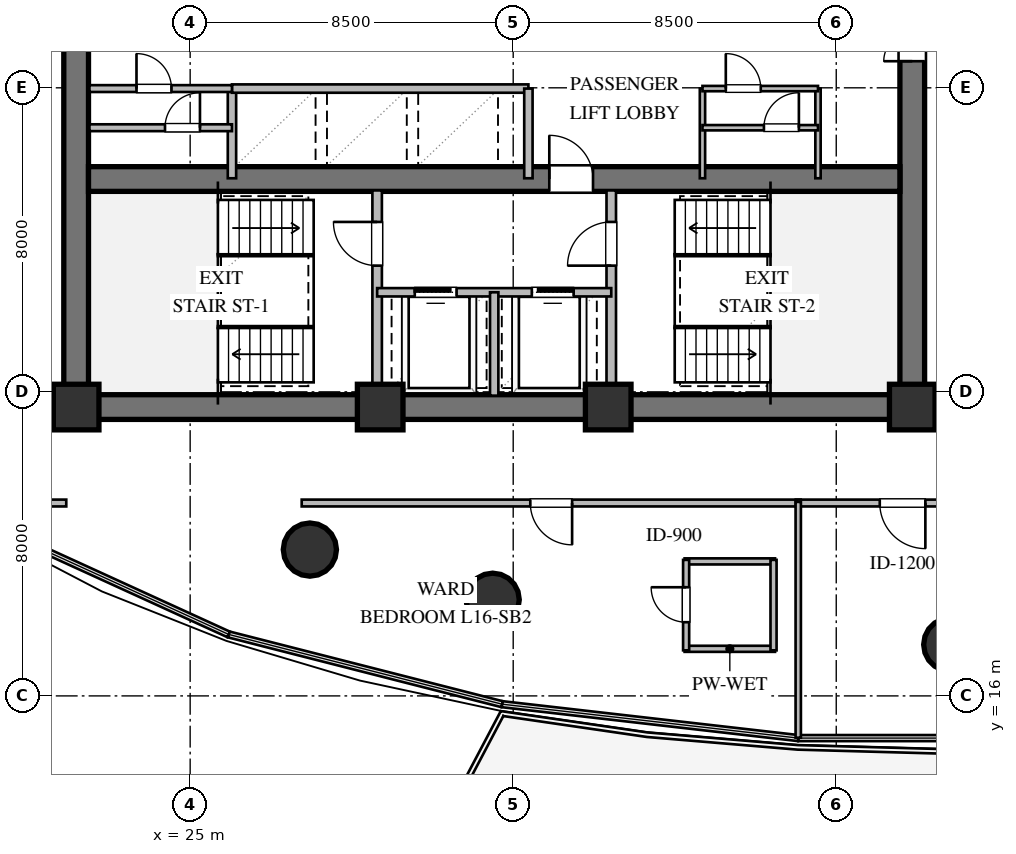
"""IFC4 building model, lengths in metres.
Left out: names, types, materials, properties, quantities, classifications, styles, units other than length and angle.
Written with IfcOpenShell. Run it as: python <this file> out.ifc"""

import sys

from ifc_helpers import new_model, si_unit, direction, frame, frame_2d, origin, origin_2d, place, context, subcontext, project, spatial, rectangle, circle, extrude, element, fill, save


model = new_model("IFC4")
c1 = context("Model", 3, precision=1e-05, world=origin(), true_north=direction((0.0, 1.0)))
c2 = subcontext(c1, "Body", "Model", "MODEL_VIEW")
j1 = project(units=[si_unit("LENGTHUNIT", "METRE"), si_unit("PLANEANGLEUNIT", "RADIAN")], contexts=[c1])
p1 = place(None, origin())
s1 = spatial("IfcSite", under=j1, at=p1, CompositionType="ELEMENT")
p2 = place(p1, origin())
s2 = spatial("IfcBuilding", under=s1, at=p2, CompositionType="ELEMENT")
p3 = place(p2, frame((0.0, 0.0, 63.6)))
s3 = spatial("IfcBuildingStorey", under=s2, at=p3, CompositionType="ELEMENT", Elevation=63.6)
p4 = place(p3, frame((21.675, 23.6, 0.0), z_axis=(0.0, 0.0, 1.0), x_axis=(1.0, 0.0, 0.0)))
e1 = element("IfcWall", 1, at=p4, inside=s3, PredefinedType="SHEAR", context=c2, shape_type="SweptSolid", body=[
    extrude(rectangle(XDim=22.65, YDim=0.65, at=frame_2d((11.325, 0.0))), origin(), (0.0, 0.0, 1.0), 3.36),
])
p5 = place(p3, frame((22.0, 23.925, 0.0), z_axis=(0.0, 0.0, 1.0), x_axis=(0.0, 1.0, 0.0)))
e2 = element("IfcWall", 2, at=p5, inside=s3, PredefinedType="SHEAR", context=c2, shape_type="SweptSolid", body=[
    extrude(rectangle(XDim=12.15, YDim=0.65, at=frame_2d((6.075, 0.0))), origin(), (0.0, 0.0, 1.0), 3.36),
])
p6 = place(p3, frame((44.0, 23.925, 0.0), z_axis=(0.0, 0.0, 1.0), x_axis=(0.0, 1.0, 0.0)))
e3 = element("IfcWall", 3, at=p6, inside=s3, PredefinedType="SHEAR", context=c2, shape_type="SweptSolid", body=[
    extrude(rectangle(XDim=12.15, YDim=0.65, at=frame_2d((6.075, 0.0))), origin(), (0.0, 0.0, 1.0), 3.36),
])
p7 = place(p6, frame((8.775, 0.0, 0.0)))
e4 = element("IfcOpeningElement", 4, at=p7, cuts=e3, PredefinedType="OPENING", context=c2, shape_type="SweptSolid", body=[
    extrude(rectangle(XDim=1.5, YDim=2.15, at=frame_2d((0.75, 1.075))), frame((0.0, 0.335, 0.0), z_axis=(0.0, -1.0, 0.0), x_axis=(1.0, 0.0, 0.0)), (0.0, 0.0, 1.0), 0.67),
])
p8 = place(p3, frame((22.325, 29.6, 0.0), z_axis=(0.0, 0.0, 1.0), x_axis=(1.0, 0.0, 0.0)))
e5 = element("IfcWall", 5, at=p8, inside=s3, PredefinedType="SHEAR", context=c2, shape_type="SweptSolid", body=[
    extrude(rectangle(XDim=21.35, YDim=0.65, at=frame_2d((10.675, 0.0))), origin(), (0.0, 0.0, 1.0), 3.36),
])
p9 = place(p8, frame((12.125, 0.0, 0.0)))
e6 = element("IfcOpeningElement", 6, at=p9, cuts=e5, PredefinedType="OPENING", context=c2, shape_type="SweptSolid", body=[
    extrude(rectangle(XDim=1.15, YDim=2.1, at=frame_2d((0.575, 1.05))), frame((0.0, 0.335, 0.0), z_axis=(0.0, -1.0, 0.0), x_axis=(1.0, 0.0, 0.0)), (0.0, 0.0, 1.0), 0.67),
])
for number, where, z_axis, x_axis in (
    (7, (22.0, 23.6, 0.0), (0.0, 0.0, 1.0), (1.0, 0.0, 0.0)),
    (8, (30.0, 23.6, 0.0), (0.0, 0.0, 1.0), (1.0, 0.0, 0.0)),
    (9, (36.0, 23.6, 0.0), (0.0, 0.0, 1.0), (1.0, 0.0, 0.0)),
    (10, (44.0, 23.6, 0.0), (0.0, 0.0, 1.0), (1.0, 0.0, 0.0)),
):
    element("IfcColumn", number, at=place(p3, frame(where, z_axis=z_axis, x_axis=x_axis)), inside=s3, PredefinedType="COLUMN", context=c2, shape_type="SweptSolid", body=[
        extrude(rectangle(XDim=1.2, YDim=1.2, at=origin_2d()), origin(), (0.0, 0.0, 1.0), 3.6),
    ])
for number, where, z_axis, x_axis in (
    (11, (28.15, 19.85, 0.0), (0.0, 0.0, 1.0), (1.0, 0.0, 0.0)),
    (12, (32.96, 18.53, 0.0), (0.0, 0.0, 1.0), (1.0, 0.0, 0.0)),
    (13, (45.0, 17.35, 0.0), (0.0, 0.0, 1.0), (1.0, 0.0, 0.0)),
):
    element("IfcColumn", number, at=place(p3, frame(where, z_axis=z_axis, x_axis=x_axis)), inside=s3, PredefinedType="COLUMN", context=c2, shape_type="SweptSolid", body=[
        extrude(circle(Radius=0.7, at=origin_2d()), origin(), (0.0, 0.0, 1.0), 3.6),
    ])
p10 = place(p3, frame((29.92, 23.9, 0.0), z_axis=(0.0, 0.0, 1.0), x_axis=(0.0, 1.0, 0.0)))
e14 = element("IfcWall", 14, at=p10, inside=s3, PredefinedType="SOLIDWALL", context=c2, shape_type="SweptSolid", body=[
    extrude(rectangle(XDim=5.4, YDim=0.25, at=frame_2d((2.7, 0.0))), origin(), (0.0, 0.0, 1.0), 3.36),
])
p11 = place(p10, frame((3.421, 0.0, 0.0)))
e15 = element("IfcOpeningElement", 15, at=p11, cuts=e14, PredefinedType="OPENING", context=c2, shape_type="SweptSolid", body=[
    extrude(rectangle(XDim=1.15, YDim=2.1, at=frame_2d((0.575, 1.05))), frame((0.0, 0.135, 0.0), z_axis=(0.0, -1.0, 0.0), x_axis=(1.0, 0.0, 0.0)), (0.0, 0.0, 1.0), 0.27),
])
p12 = place(p3, frame((36.08, 23.9, 0.0), z_axis=(0.0, 0.0, 1.0), x_axis=(0.0, 1.0, 0.0)))
e16 = element("IfcWall", 16, at=p12, inside=s3, PredefinedType="SOLIDWALL", context=c2, shape_type="SweptSolid", body=[
    extrude(rectangle(XDim=5.4, YDim=0.25, at=frame_2d((2.7, 0.0))), origin(), (0.0, 0.0, 1.0), 3.36),
])
p13 = place(p12, frame((3.421, 0.0, 0.0)))
e17 = element("IfcOpeningElement", 17, at=p13, cuts=e16, PredefinedType="OPENING", context=c2, shape_type="SweptSolid", body=[
    extrude(rectangle(XDim=1.15, YDim=2.1, at=frame_2d((0.575, 1.05))), frame((0.0, 0.135, 0.0), z_axis=(0.0, -1.0, 0.0), x_axis=(1.0, 0.0, 0.0)), (0.0, 0.0, 1.0), 0.27),
])
p14 = place(p3, frame((29.92, 26.62, 0.0), z_axis=(0.0, 0.0, 1.0), x_axis=(1.0, 0.0, 0.0)))
e18 = element("IfcWall", 18, at=p14, inside=s3, PredefinedType="SOLIDWALL", context=c2, shape_type="SweptSolid", body=[
    extrude(rectangle(XDim=6.16, YDim=0.22, at=frame_2d((3.08, 0.0))), origin(), (0.0, 0.0, 1.0), 3.36),
])
p15 = place(p14, frame((0.99, 0.0, 0.0)))
e19 = element("IfcOpeningElement", 19, at=p15, cuts=e18, PredefinedType="OPENING", context=c2, shape_type="SweptSolid", body=[
    extrude(rectangle(XDim=1.1, YDim=2.1, at=frame_2d((0.55, 1.05))), frame((0.0, 0.12, 0.0), z_axis=(0.0, -1.0, 0.0), x_axis=(1.0, 0.0, 0.0)), (0.0, 0.0, 1.0), 0.24),
])
p16 = place(p14, frame((4.07, 0.0, 0.0)))
e20 = element("IfcOpeningElement", 20, at=p16, cuts=e18, PredefinedType="OPENING", context=c2, shape_type="SweptSolid", body=[
    extrude(rectangle(XDim=1.1, YDim=2.1, at=frame_2d((0.55, 1.05))), frame((0.0, 0.12, 0.0), z_axis=(0.0, -1.0, 0.0), x_axis=(1.0, 0.0, 0.0)), (0.0, 0.0, 1.0), 0.24),
])
p17 = place(p3, frame((33.0, 23.9, 0.0), z_axis=(0.0, 0.0, 1.0), x_axis=(0.0, 1.0, 0.0)))
e21 = element("IfcWall", 21, at=p17, inside=s3, PredefinedType="SOLIDWALL", context=c2, shape_type="SweptSolid", body=[
    extrude(rectangle(XDim=2.72, YDim=0.22, at=frame_2d((1.36, 0.0))), origin(), (0.0, 0.0, 1.0), 3.36),
])
p18 = place(p3, frame((26.1, 29.62, 0.0), z_axis=(0.0, 0.0, 1.0), x_axis=(0.0, 1.0, 0.0)))
e22 = element("IfcWall", 22, at=p18, inside=s3, PredefinedType="SOLIDWALL", context=c2, shape_type="SweptSolid", body=[
    extrude(rectangle(XDim=2.36, YDim=0.22, at=frame_2d((1.18, 0.0))), origin(), (0.0, 0.0, 1.0), 3.36),
])
p19 = place(p3, frame((26.1, 31.98, 0.0), z_axis=(0.0, 0.0, 1.0), x_axis=(1.0, 0.0, 0.0)))
e23 = element("IfcWall", 23, at=p19, inside=s3, PredefinedType="SOLIDWALL", context=c2, shape_type="SweptSolid", body=[
    extrude(rectangle(XDim=7.8, YDim=0.22, at=frame_2d((3.9, 0.0))), origin(), (0.0, 0.0, 1.0), 3.36),
])
p20 = place(p3, frame((33.9, 29.62, 0.0), z_axis=(0.0, 0.0, 1.0), x_axis=(0.0, 1.0, 0.0)))
e24 = element("IfcWall", 24, at=p20, inside=s3, PredefinedType="SOLIDWALL", context=c2, shape_type="SweptSolid", body=[
    extrude(rectangle(XDim=2.36, YDim=0.22, at=frame_2d((1.18, 0.0))), origin(), (0.0, 0.0, 1.0), 3.36),
])
p21 = place(p3, frame((22.35, 30.95, 0.0), z_axis=(0.0, 0.0, 1.0), x_axis=(1.0, 0.0, 0.0)))
e25 = element("IfcWall", 25, at=p21, inside=s3, PredefinedType="PARTITIONING", context=c2, shape_type="SweptSolid", body=[
    extrude(rectangle(XDim=3.75, YDim=0.18, at=frame_2d((1.875, 0.0))), origin(), (0.0, 0.0, 1.0), 3.36),
])
p22 = place(p21, frame((1.988, 0.0, 0.0)))
e26 = element("IfcOpeningElement", 26, at=p22, cuts=e25, PredefinedType="OPENING", context=c2, shape_type="SweptSolid", body=[
    extrude(rectangle(XDim=0.92, YDim=2.1, at=frame_2d((0.46, 1.05))), frame((0.0, 0.1, 0.0), z_axis=(0.0, -1.0, 0.0), x_axis=(1.0, 0.0, 0.0)), (0.0, 0.0, 1.0), 0.2),
])
p23 = place(p3, frame((22.35, 31.98, 0.0), z_axis=(0.0, 0.0, 1.0), x_axis=(1.0, 0.0, 0.0)))
e27 = element("IfcWall", 27, at=p23, inside=s3, PredefinedType="PARTITIONING", context=c2, shape_type="SweptSolid", body=[
    extrude(rectangle(XDim=3.75, YDim=0.18, at=frame_2d((1.875, 0.0))), origin(), (0.0, 0.0, 1.0), 3.36),
])
p24 = place(p23, frame((1.238, 0.0, 0.0)))
e28 = element("IfcOpeningElement", 28, at=p24, cuts=e27, PredefinedType="OPENING", context=c2, shape_type="SweptSolid", body=[
    extrude(rectangle(XDim=0.92, YDim=2.1, at=frame_2d((0.46, 1.05))), frame((0.0, 0.1, 0.0), z_axis=(0.0, -1.0, 0.0), x_axis=(1.0, 0.0, 0.0)), (0.0, 0.0, 1.0), 0.2),
])
for number, where, z_axis, x_axis in (
    (29, (38.48, 29.62, 0.0), (0.0, 0.0, 1.0), (0.0, 1.0, 0.0)),
    (30, (41.52, 29.62, 0.0), (0.0, 0.0, 1.0), (0.0, 1.0, 0.0)),
):
    element("IfcWall", number, at=place(p3, frame(where, z_axis=z_axis, x_axis=x_axis)), inside=s3, PredefinedType="PARTITIONING", context=c2, shape_type="SweptSolid", body=[
        extrude(rectangle(XDim=2.36, YDim=0.14, at=frame_2d((1.18, 0.0))), origin(), (0.0, 0.0, 1.0), 3.36),
    ])
p25 = place(p3, frame((38.48, 30.95, 0.0), z_axis=(0.0, 0.0, 1.0), x_axis=(1.0, 0.0, 0.0)))
e31 = element("IfcWall", 31, at=p25, inside=s3, PredefinedType="PARTITIONING", context=c2, shape_type="SweptSolid", body=[
    extrude(rectangle(XDim=3.04, YDim=0.14, at=frame_2d((1.52, 0.0))), origin(), (0.0, 0.0, 1.0), 3.36),
])
p26 = place(p25, frame((1.617, 0.0, 0.0)))
e32 = element("IfcOpeningElement", 32, at=p26, cuts=e31, PredefinedType="OPENING", context=c2, shape_type="SweptSolid", body=[
    extrude(rectangle(XDim=0.92, YDim=2.1, at=frame_2d((0.46, 1.05))), frame((0.0, 0.08, 0.0), z_axis=(0.0, -1.0, 0.0), x_axis=(1.0, 0.0, 0.0)), (0.0, 0.0, 1.0), 0.16),
])
p27 = place(p3, frame((38.48, 31.98, 0.0), z_axis=(0.0, 0.0, 1.0), x_axis=(1.0, 0.0, 0.0)))
e33 = element("IfcWall", 33, at=p27, inside=s3, PredefinedType="PARTITIONING", context=c2, shape_type="SweptSolid", body=[
    extrude(rectangle(XDim=3.04, YDim=0.14, at=frame_2d((1.52, 0.0))), origin(), (0.0, 0.0, 1.0), 3.36),
])
p28 = place(p27, frame((0.614, 0.0, 0.0)))
e34 = element("IfcOpeningElement", 34, at=p28, cuts=e33, PredefinedType="OPENING", context=c2, shape_type="SweptSolid", body=[
    extrude(rectangle(XDim=0.92, YDim=2.1, at=frame_2d((0.46, 1.05))), frame((0.0, 0.08, 0.0), z_axis=(0.0, -1.0, 0.0), x_axis=(1.0, 0.0, 0.0)), (0.0, 0.0, 1.0), 0.16),
])
p29 = place(p3, frame((38.01, 17.239, 0.0), z_axis=(0.0, 0.0, 1.0), x_axis=(1.0, 0.0, 0.0)))
e35 = element("IfcWall", 35, at=p29, inside=s3, PredefinedType="PLUMBINGWALL", context=c2, shape_type="SweptSolid", body=[
    extrude(rectangle(XDim=2.38, YDim=0.16, at=frame_2d((1.19, 0.0))), origin(), (0.0, 0.0, 1.0), 2.738),
])
p30 = place(p3, frame((38.01, 19.539, 0.0), z_axis=(0.0, 0.0, 1.0), x_axis=(1.0, 0.0, 0.0)))
e36 = element("IfcWall", 36, at=p30, inside=s3, PredefinedType="PLUMBINGWALL", context=c2, shape_type="SweptSolid", body=[
    extrude(rectangle(XDim=2.38, YDim=0.16, at=frame_2d((1.19, 0.0))), origin(), (0.0, 0.0, 1.0), 3.36),
])
p31 = place(p3, frame((38.05, 17.199, 0.0), z_axis=(0.0, 0.0, 1.0), x_axis=(0.0, 1.0, 0.0)))
e37 = element("IfcWall", 37, at=p31, inside=s3, PredefinedType="PLUMBINGWALL", context=c2, shape_type="SweptSolid", body=[
    extrude(rectangle(XDim=2.38, YDim=0.16, at=frame_2d((1.19, 0.0))), origin(), (0.0, 0.0, 1.0), 3.36),
])
p32 = place(p31, frame((0.74, 0.0, 0.0)))
e38 = element("IfcOpeningElement", 38, at=p32, cuts=e37, PredefinedType="OPENING", context=c2, shape_type="SweptSolid", body=[
    extrude(rectangle(XDim=0.92, YDim=2.1, at=frame_2d((0.46, 1.05))), frame((0.0, 0.09, 0.0), z_axis=(0.0, -1.0, 0.0), x_axis=(1.0, 0.0, 0.0)), (0.0, 0.0, 1.0), 0.18),
])
p33 = place(p3, frame((40.35, 17.199, 0.0), z_axis=(0.0, 0.0, 1.0), x_axis=(0.0, 1.0, 0.0)))
e39 = element("IfcWall", 39, at=p33, inside=s3, PredefinedType="PLUMBINGWALL", context=c2, shape_type="SweptSolid", body=[
    extrude(rectangle(XDim=2.38, YDim=0.16, at=frame_2d((1.19, 0.0))), origin(), (0.0, 0.0, 1.0), 3.36),
])
p34 = place(p3, frame((41.065, 21.075, 0.0), z_axis=(0.0, 0.0, 1.0), x_axis=(-1.0, 0.0, 0.0)))
e40 = element("IfcWall", 40, at=p34, inside=s3, PredefinedType="PARTITIONING", context=c2, shape_type="SweptSolid", body=[
    extrude(rectangle(XDim=13.13, YDim=0.18, at=frame_2d((6.565, 0.0))), origin(), (0.0, 0.0, 1.0), 2.996),
])
p35 = place(p34, frame((6.015, 0.0, 0.0)))
e41 = element("IfcOpeningElement", 41, at=p35, cuts=e40, PredefinedType="OPENING", context=c2, shape_type="SweptSolid", body=[
    extrude(rectangle(XDim=1.1, YDim=2.1, at=frame_2d((0.55, 1.05))), frame((0.0, 0.1, 0.0), z_axis=(0.0, -1.0, 0.0), x_axis=(1.0, 0.0, 0.0)), (0.0, 0.0, 1.0), 0.2),
])
p36 = place(p3, frame((46.555, 21.075, 0.0), z_axis=(0.0, 0.0, 1.0), x_axis=(-1.0, 0.0, 0.0)))
e42 = element("IfcWall", 42, at=p36, inside=s3, PredefinedType="PARTITIONING", context=c2, shape_type="SweptSolid", body=[
    extrude(rectangle(XDim=5.62, YDim=0.18, at=frame_2d((2.81, 0.0))), origin(), (0.0, 0.0, 1.0), 3.36),
])
p37 = place(p36, frame((2.21, 0.0, 0.0)))
e43 = element("IfcOpeningElement", 43, at=p37, cuts=e42, PredefinedType="OPENING", context=c2, shape_type="SweptSolid", body=[
    extrude(rectangle(XDim=1.2, YDim=2.15, at=frame_2d((0.6, 1.075))), frame((0.0, 0.1, 0.0), z_axis=(0.0, -1.0, 0.0), x_axis=(1.0, 0.0, 0.0)), (0.0, 0.0, 1.0), 0.2),
])
p38 = place(p3, frame((21.74, 21.075, 0.0), z_axis=(0.0, 0.0, 1.0), x_axis=(-1.0, 0.0, 0.0)))
e44 = element("IfcWall", 44, at=p38, inside=s3, PredefinedType="PARTITIONING", context=c2, shape_type="SweptSolid", body=[
    extrude(rectangle(XDim=2.645, YDim=0.18, at=frame_2d((1.323, 0.0))), origin(), (0.0, 0.0, 1.0), 3.36),
])
p39 = place(p3, frame((41.0, 21.105, 0.0), z_axis=(0.0, 0.0, 1.0), x_axis=(0.0, -1.0, 0.0)))
e45 = element("IfcWall", 45, at=p39, inside=s3, PredefinedType="PARTITIONING", context=c2, shape_type="SweptSolid", body=[
    extrude(rectangle(XDim=6.205, YDim=0.14, at=frame_2d((3.103, 0.0))), origin(), (0.0, 0.0, 1.0), 3.36),
])
p40 = place(p11, origin())
e46 = element("IfcDoor", 46, at=p40, inside=s3, OperationType="SINGLE_SWING_RIGHT", PredefinedType="DOOR", context=c2, shape_type="SweptSolid", body=[
    extrude(rectangle(XDim=1.15, YDim=2.1, at=frame_2d((0.575, 1.05))), frame((0.0, 0.025, 0.0), z_axis=(0.0, -1.0, 0.0), x_axis=(1.0, 0.0, 0.0)), (0.0, 0.0, 1.0), 0.05),
])
fill(e15, e46)
p41 = place(p13, origin())
e47 = element("IfcDoor", 47, at=p41, inside=s3, OperationType="SINGLE_SWING_LEFT", PredefinedType="DOOR", context=c2, shape_type="SweptSolid", body=[
    extrude(rectangle(XDim=1.15, YDim=2.1, at=frame_2d((0.575, 1.05))), frame((0.0, 0.025, 0.0), z_axis=(0.0, -1.0, 0.0), x_axis=(1.0, 0.0, 0.0)), (0.0, 0.0, 1.0), 0.05),
])
fill(e17, e47)
p42 = place(p15, origin())
e48 = element("IfcDoor", 48, at=p42, inside=s3, OperationType="SLIDING_TO_LEFT", PredefinedType="DOOR", context=c2, shape_type="SweptSolid", body=[
    extrude(rectangle(XDim=1.1, YDim=2.1, at=frame_2d((0.55, 1.05))), frame((0.0, 0.025, 0.0), z_axis=(0.0, -1.0, 0.0), x_axis=(1.0, 0.0, 0.0)), (0.0, 0.0, 1.0), 0.05),
])
fill(e19, e48)
p43 = place(p16, origin())
e49 = element("IfcDoor", 49, at=p43, inside=s3, OperationType="SLIDING_TO_RIGHT", PredefinedType="DOOR", context=c2, shape_type="SweptSolid", body=[
    extrude(rectangle(XDim=1.1, YDim=2.1, at=frame_2d((0.55, 1.05))), frame((0.0, 0.025, 0.0), z_axis=(0.0, -1.0, 0.0), x_axis=(1.0, 0.0, 0.0)), (0.0, 0.0, 1.0), 0.05),
])
fill(e20, e49)
p44 = place(p9, origin())
e50 = element("IfcDoor", 50, at=p44, inside=s3, OperationType="SINGLE_SWING_LEFT", PredefinedType="DOOR", context=c2, shape_type="SweptSolid", body=[
    extrude(rectangle(XDim=1.15, YDim=2.1, at=frame_2d((0.575, 1.05))), frame((0.0, 0.025, 0.0), z_axis=(0.0, -1.0, 0.0), x_axis=(1.0, 0.0, 0.0)), (0.0, 0.0, 1.0), 0.05),
])
fill(e6, e50)
p45 = place(p7, origin())
e51 = element("IfcDoor", 51, at=p45, inside=s3, OperationType="DOUBLE_DOOR_SINGLE_SWING", PredefinedType="DOOR", context=c2, shape_type="SweptSolid", body=[
    extrude(rectangle(XDim=1.5, YDim=2.15, at=frame_2d((0.75, 1.075))), frame((0.0, 0.025, 0.0), z_axis=(0.0, -1.0, 0.0), x_axis=(1.0, 0.0, 0.0)), (0.0, 0.0, 1.0), 0.05),
])
fill(e4, e51)
p46 = place(p24, origin())
e52 = element("IfcDoor", 52, at=p46, inside=s3, OperationType="SINGLE_SWING_LEFT", PredefinedType="DOOR", context=c2, shape_type="SweptSolid", body=[
    extrude(rectangle(XDim=0.92, YDim=2.1, at=frame_2d((0.46, 1.05))), frame((0.0, 0.025, 0.0), z_axis=(0.0, -1.0, 0.0), x_axis=(1.0, 0.0, 0.0)), (0.0, 0.0, 1.0), 0.05),
])
fill(e28, e52)
p47 = place(p22, origin())
e53 = element("IfcDoor", 53, at=p47, inside=s3, OperationType="SINGLE_SWING_RIGHT", PredefinedType="DOOR", context=c2, shape_type="SweptSolid", body=[
    extrude(rectangle(XDim=0.92, YDim=2.1, at=frame_2d((0.46, 1.05))), frame((0.0, 0.025, 0.0), z_axis=(0.0, -1.0, 0.0), x_axis=(1.0, 0.0, 0.0)), (0.0, 0.0, 1.0), 0.05),
])
fill(e26, e53)
p48 = place(p28, origin())
e54 = element("IfcDoor", 54, at=p48, inside=s3, OperationType="SINGLE_SWING_LEFT", PredefinedType="DOOR", context=c2, shape_type="SweptSolid", body=[
    extrude(rectangle(XDim=0.92, YDim=2.1, at=frame_2d((0.46, 1.05))), frame((0.0, 0.025, 0.0), z_axis=(0.0, -1.0, 0.0), x_axis=(1.0, 0.0, 0.0)), (0.0, 0.0, 1.0), 0.05),
])
fill(e34, e54)
p49 = place(p26, origin())
e55 = element("IfcDoor", 55, at=p49, inside=s3, OperationType="SINGLE_SWING_RIGHT", PredefinedType="DOOR", context=c2, shape_type="SweptSolid", body=[
    extrude(rectangle(XDim=0.92, YDim=2.1, at=frame_2d((0.46, 1.05))), frame((0.0, 0.025, 0.0), z_axis=(0.0, -1.0, 0.0), x_axis=(1.0, 0.0, 0.0)), (0.0, 0.0, 1.0), 0.05),
])
fill(e32, e55)
p50 = place(p32, origin())
e56 = element("IfcDoor", 56, at=p50, inside=s3, OperationType="SINGLE_SWING_RIGHT", PredefinedType="DOOR", context=c2, shape_type="SweptSolid", body=[
    extrude(rectangle(XDim=0.92, YDim=2.1, at=frame_2d((0.46, 1.05))), frame((0.0, 0.025, 0.0), z_axis=(0.0, -1.0, 0.0), x_axis=(1.0, 0.0, 0.0)), (0.0, 0.0, 1.0), 0.05),
])
fill(e38, e56)
p51 = place(p35, origin())
e57 = element("IfcDoor", 57, at=p51, inside=s3, OperationType="SINGLE_SWING_LEFT", PredefinedType="DOOR", context=c2, shape_type="SweptSolid", body=[
    extrude(rectangle(XDim=1.1, YDim=2.1, at=frame_2d((0.55, 1.05))), frame((0.0, 0.025, 0.0), z_axis=(0.0, -1.0, 0.0), x_axis=(1.0, 0.0, 0.0)), (0.0, 0.0, 1.0), 0.05),
])
fill(e41, e57)
p52 = place(p37, origin())
e58 = element("IfcDoor", 58, at=p52, inside=s3, OperationType="SINGLE_SWING_LEFT", PredefinedType="DOOR", context=c2, shape_type="SweptSolid", body=[
    extrude(rectangle(XDim=1.2, YDim=2.15, at=frame_2d((0.6, 1.075))), frame((0.0, 0.025, 0.0), z_axis=(0.0, -1.0, 0.0), x_axis=(1.0, 0.0, 0.0)), (0.0, 0.0, 1.0), 0.05),
])
fill(e43, e58)
save(model, sys.argv[1])
